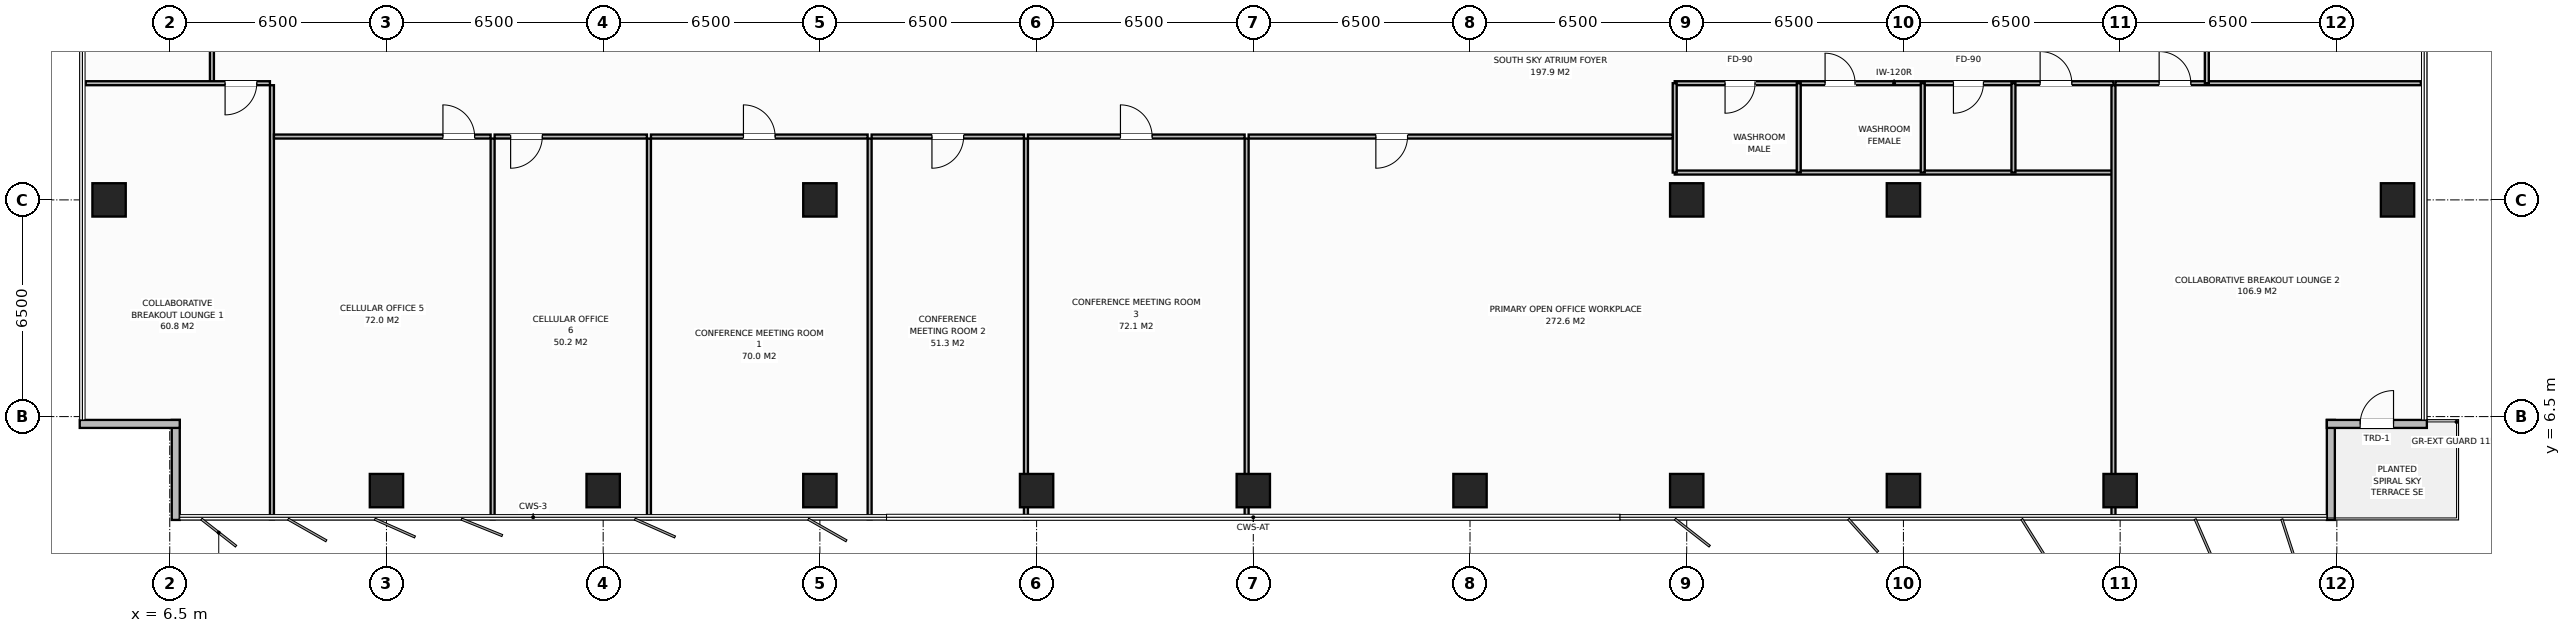
"""IFC4 building model, lengths in metres.
Left out: names, types, materials, properties, quantities, classifications, styles, units other than length and angle.
Written with IfcOpenShell. Run it as: python <this file> out.ifc"""

import sys

from ifc_helpers import new_model, si_unit, direction, frame, frame_2d, origin, origin_2d, place, context, subcontext, project, spatial, rectangle, extrude, element, fill, save


model = new_model("IFC4")
c1 = context("Model", 3, precision=1e-05, world=origin(), true_north=direction((0.0, 1.0)))
c2 = subcontext(c1, "Body", "Model", "MODEL_VIEW")
j1 = project(units=[si_unit("LENGTHUNIT", "METRE"), si_unit("PLANEANGLEUNIT", "RADIAN")], contexts=[c1])
p1 = place(None, origin())
s1 = spatial("IfcSite", under=j1, at=p1, CompositionType="ELEMENT")
p2 = place(p1, origin())
s2 = spatial("IfcBuilding", under=s1, at=p2, CompositionType="ELEMENT")
p3 = place(p2, frame((0.0, 0.0, 178.4)))
s3 = spatial("IfcBuildingStorey", under=s2, at=p3, CompositionType="ELEMENT", Elevation=178.4)
for number, where, z_axis, x_axis in (
    (1, (58.5, 13.0, 0.0), (0.0, 0.0, 1.0), (1.0, 0.0, 0.0)),
    (2, (26.0, 13.0, 0.0), (0.0, 0.0, 1.0), (1.0, 0.0, 0.0)),
    (3, (52.0, 13.0, 0.0), (0.0, 0.0, 1.0), (1.0, 0.0, 0.0)),
    (4, (13.0, 4.28, 0.0), (0.0, 0.0, 1.0), (1.0, 0.0, 0.0)),
    (5, (19.5, 4.28, 0.0), (0.0, 0.0, 1.0), (1.0, 0.0, 0.0)),
    (6, (26.0, 4.28, 0.0), (0.0, 0.0, 1.0), (1.0, 0.0, 0.0)),
    (7, (32.5, 4.28, 0.0), (0.0, 0.0, 1.0), (1.0, 0.0, 0.0)),
    (8, (39.0, 4.28, 0.0), (0.0, 0.0, 1.0), (1.0, 0.0, 0.0)),
    (9, (45.5, 4.28, 0.0), (0.0, 0.0, 1.0), (1.0, 0.0, 0.0)),
    (10, (52.0, 4.28, 0.0), (0.0, 0.0, 1.0), (1.0, 0.0, 0.0)),
    (11, (58.5, 4.28, 0.0), (0.0, 0.0, 1.0), (1.0, 0.0, 0.0)),
    (12, (65.0, 4.28, 0.0), (0.0, 0.0, 1.0), (1.0, 0.0, 0.0)),
    (13, (4.68, 13.0, 0.0), (0.0, 0.0, 1.0), (1.0, 0.0, 0.0)),
    (14, (73.32, 13.0, 0.0), (0.0, 0.0, 1.0), (1.0, 0.0, 0.0)),
):
    element("IfcColumn", number, at=place(p3, frame(where, z_axis=z_axis, x_axis=x_axis)), inside=s3, PredefinedType="COLUMN", context=c2, shape_type="SweptSolid", body=[
        extrude(rectangle(XDim=1.0, YDim=1.0, at=origin_2d()), origin(), (0.0, 0.0, 1.0), 3.8),
    ])
for number, where, z_axis, x_axis in (
    (15, (6.68, 3.4, 0.0), (0.0, 0.0, 1.0), (0.0, 1.0, 0.0)),
    (16, (6.8, 6.28, 0.0), (0.0, 0.0, 1.0), (-1.0, 0.0, 0.0)),
    (17, (71.32, 6.4, 0.0), (0.0, 0.0, 1.0), (0.0, -1.0, 0.0)),
):
    element("IfcWall", number, at=place(p3, frame(where, z_axis=z_axis, x_axis=x_axis)), inside=s3, PredefinedType="STANDARD", context=c2, shape_type="SweptSolid", body=[
        extrude(rectangle(XDim=3.0, YDim=0.24, at=frame_2d((1.5, 0.0))), origin(), (0.0, 0.0, 1.0), 3.572),
    ])
p4 = place(p3, frame((74.2, 6.28, 0.0), z_axis=(0.0, 0.0, 1.0), x_axis=(-1.0, 0.0, 0.0)))
e18 = element("IfcWall", 18, at=p4, inside=s3, PredefinedType="STANDARD", context=c2, shape_type="SweptSolid", body=[
    extrude(rectangle(XDim=3.0, YDim=0.24, at=frame_2d((1.5, 0.0))), origin(), (0.0, 0.0, 1.0), 3.572),
])
p5 = place(p4, frame((1.0, 0.0, 0.0)))
e19 = element("IfcOpeningElement", 19, at=p5, cuts=e18, PredefinedType="OPENING", context=c2, shape_type="SweptSolid", body=[
    extrude(rectangle(XDim=1.0, YDim=2.2, at=frame_2d((0.5, 1.1))), frame((0.0, 0.13, 0.0), z_axis=(0.0, -1.0, 0.0), x_axis=(1.0, 0.0, 0.0)), (0.0, 0.0, 1.0), 0.26),
])
p6 = place(p3, frame((7.765, 16.5, 0.0), z_axis=(0.0, 0.0, 1.0), x_axis=(0.0, 1.0, 0.0)))
e20 = element("IfcWall", 20, at=p6, inside=s3, PredefinedType="PARTITIONING", context=c2, shape_type="SweptSolid", body=[
    extrude(rectangle(XDim=2.1, YDim=0.12, at=frame_2d((1.05, 0.0))), origin(), (0.0, 0.0, 1.0), 3.572),
])
p7 = place(p3, frame((51.64, 16.5, 0.0), z_axis=(0.0, 0.0, 1.0), x_axis=(1.0, 0.0, 0.0)))
e21 = element("IfcWall", 21, at=p7, inside=s3, PredefinedType="PARTITIONING", context=c2, shape_type="SweptSolid", body=[
    extrude(rectangle(XDim=13.16, YDim=0.12, at=frame_2d((6.58, 0.0))), origin(), (0.0, 0.0, 1.0), 3.572),
])
p8 = place(p7, frame((1.51, 0.0, 0.0)))
e22 = element("IfcOpeningElement", 22, at=p8, cuts=e21, PredefinedType="OPENING", context=c2, shape_type="SweptSolid", body=[
    extrude(rectangle(XDim=0.9, YDim=2.15, at=frame_2d((0.45, 1.075))), frame((0.0, 0.07, 0.0), z_axis=(0.0, -1.0, 0.0), x_axis=(1.0, 0.0, 0.0)), (0.0, 0.0, 1.0), 0.14),
])
p9 = place(p7, frame((4.51, 0.0, 0.0)))
e23 = element("IfcOpeningElement", 23, at=p9, cuts=e21, PredefinedType="OPENING", context=c2, shape_type="SweptSolid", body=[
    extrude(rectangle(XDim=0.9, YDim=2.15, at=frame_2d((0.45, 1.075))), frame((0.0, 0.07, 0.0), z_axis=(0.0, -1.0, 0.0), x_axis=(1.0, 0.0, 0.0)), (0.0, 0.0, 1.0), 0.14),
])
p10 = place(p7, frame((8.36, 0.0, 0.0)))
e24 = element("IfcOpeningElement", 24, at=p10, cuts=e21, PredefinedType="OPENING", context=c2, shape_type="SweptSolid", body=[
    extrude(rectangle(XDim=0.9, YDim=2.15, at=frame_2d((0.45, 1.075))), frame((0.0, 0.07, 0.0), z_axis=(0.0, -1.0, 0.0), x_axis=(1.0, 0.0, 0.0)), (0.0, 0.0, 1.0), 0.14),
])
p11 = place(p7, frame((10.96, 0.0, 0.0)))
e25 = element("IfcOpeningElement", 25, at=p11, cuts=e21, PredefinedType="OPENING", context=c2, shape_type="SweptSolid", body=[
    extrude(rectangle(XDim=0.95, YDim=2.15, at=frame_2d((0.475, 1.075))), frame((0.0, 0.07, 0.0), z_axis=(0.0, -1.0, 0.0), x_axis=(1.0, 0.0, 0.0)), (0.0, 0.0, 1.0), 0.14),
])
p12 = place(p3, frame((51.64, 13.82, 0.0), z_axis=(0.0, 0.0, 1.0), x_axis=(1.0, 0.0, 0.0)))
e26 = element("IfcWall", 26, at=p12, inside=s3, PredefinedType="PARTITIONING", context=c2, shape_type="SweptSolid", body=[
    extrude(rectangle(XDim=13.16, YDim=0.12, at=frame_2d((6.58, 0.0))), origin(), (0.0, 0.0, 1.0), 3.572),
])
for number, where, z_axis, x_axis in (
    (27, (51.64, 13.82, 0.0), (0.0, 0.0, 1.0), (0.0, 1.0, 0.0)),
    (28, (55.36, 13.82, 0.0), (0.0, 0.0, 1.0), (0.0, 1.0, 0.0)),
    (29, (59.08, 13.82, 0.0), (0.0, 0.0, 1.0), (0.0, 1.0, 0.0)),
    (30, (61.8, 13.82, 0.0), (0.0, 0.0, 1.0), (0.0, 1.0, 0.0)),
):
    element("IfcWall", number, at=place(p3, frame(where, z_axis=z_axis, x_axis=x_axis)), inside=s3, PredefinedType="PARTITIONING", context=c2, shape_type="SweptSolid", body=[
        extrude(rectangle(XDim=2.68, YDim=0.12, at=frame_2d((1.34, 0.0))), origin(), (0.0, 0.0, 1.0), 3.572),
    ])
p13 = place(p3, frame((9.565, 3.42, 0.0), z_axis=(0.0, 0.0, 1.0), x_axis=(0.0, 1.0, 0.0)))
e31 = element("IfcWall", 31, at=p13, inside=s3, PredefinedType="PARTITIONING", context=c2, shape_type="SweptSolid", body=[
    extrude(rectangle(XDim=13.02, YDim=0.12, at=frame_2d((6.51, 0.0))), origin(), (0.0, 0.0, 1.0), 3.572),
])
p14 = place(p3, frame((3.98, 16.5, 0.0), z_axis=(0.0, 0.0, 1.0), x_axis=(1.0, 0.0, 0.0)))
e32 = element("IfcWall", 32, at=p14, inside=s3, PredefinedType="PARTITIONING", context=c2, shape_type="SweptSolid", body=[
    extrude(rectangle(XDim=5.525, YDim=0.12, at=frame_2d((2.762, 0.0))), origin(), (0.0, 0.0, 1.0), 3.572),
])
p15 = place(p14, frame((4.18, 0.0, 0.0)))
e33 = element("IfcOpeningElement", 33, at=p15, cuts=e32, PredefinedType="OPENING", context=c2, shape_type="SweptSolid", body=[
    extrude(rectangle(XDim=0.95, YDim=2.15, at=frame_2d((0.475, 1.075))), frame((0.0, 0.07, 0.0), z_axis=(0.0, -1.0, 0.0), x_axis=(1.0, 0.0, 0.0)), (0.0, 0.0, 1.0), 0.14),
])
p16 = place(p3, frame((16.184, 3.42, 0.0), z_axis=(0.0, 0.0, 1.0), x_axis=(0.0, 1.0, 0.0)))
e34 = element("IfcWall", 34, at=p16, inside=s3, PredefinedType="PARTITIONING", context=c2, shape_type="SweptSolid", body=[
    extrude(rectangle(XDim=11.42, YDim=0.12, at=frame_2d((5.71, 0.0))), origin(), (0.0, 0.0, 1.0), 3.572),
])
p17 = place(p3, frame((9.625, 14.9, 0.0), z_axis=(0.0, 0.0, 1.0), x_axis=(1.0, 0.0, 0.0)))
e35 = element("IfcWall", 35, at=p17, inside=s3, PredefinedType="PARTITIONING", context=c2, shape_type="SweptSolid", body=[
    extrude(rectangle(XDim=6.499, YDim=0.12, at=frame_2d((3.25, 0.0))), origin(), (0.0, 0.0, 1.0), 3.572),
])
p18 = place(p17, frame((5.069, 0.0, 0.0)))
e36 = element("IfcOpeningElement", 36, at=p18, cuts=e35, PredefinedType="OPENING", context=c2, shape_type="SweptSolid", body=[
    extrude(rectangle(XDim=0.95, YDim=2.15, at=frame_2d((0.475, 1.075))), frame((0.0, 0.07, 0.0), z_axis=(0.0, -1.0, 0.0), x_axis=(1.0, 0.0, 0.0)), (0.0, 0.0, 1.0), 0.14),
])
p19 = place(p3, frame((20.873, 3.42, 0.0), z_axis=(0.0, 0.0, 1.0), x_axis=(0.0, 1.0, 0.0)))
e37 = element("IfcWall", 37, at=p19, inside=s3, PredefinedType="PARTITIONING", context=c2, shape_type="SweptSolid", body=[
    extrude(rectangle(XDim=11.42, YDim=0.12, at=frame_2d((5.71, 0.0))), origin(), (0.0, 0.0, 1.0), 3.572),
])
p20 = place(p3, frame((16.244, 14.9, 0.0), z_axis=(0.0, 0.0, 1.0), x_axis=(1.0, 0.0, 0.0)))
e38 = element("IfcWall", 38, at=p20, inside=s3, PredefinedType="PARTITIONING", context=c2, shape_type="SweptSolid", body=[
    extrude(rectangle(XDim=4.569, YDim=0.12, at=frame_2d((2.284, 0.0))), origin(), (0.0, 0.0, 1.0), 3.572),
])
p21 = place(p20, frame((0.48, 0.0, 0.0)))
e39 = element("IfcOpeningElement", 39, at=p21, cuts=e38, PredefinedType="OPENING", context=c2, shape_type="SweptSolid", body=[
    extrude(rectangle(XDim=0.95, YDim=2.15, at=frame_2d((0.475, 1.075))), frame((0.0, 0.07, 0.0), z_axis=(0.0, -1.0, 0.0), x_axis=(1.0, 0.0, 0.0)), (0.0, 0.0, 1.0), 0.14),
])
p22 = place(p3, frame((27.492, 3.42, 0.0), z_axis=(0.0, 0.0, 1.0), x_axis=(0.0, 1.0, 0.0)))
e40 = element("IfcWall", 40, at=p22, inside=s3, PredefinedType="PARTITIONING", context=c2, shape_type="SweptSolid", body=[
    extrude(rectangle(XDim=11.42, YDim=0.12, at=frame_2d((5.71, 0.0))), origin(), (0.0, 0.0, 1.0), 3.572),
])
p23 = place(p3, frame((20.933, 14.9, 0.0), z_axis=(0.0, 0.0, 1.0), x_axis=(1.0, 0.0, 0.0)))
e41 = element("IfcWall", 41, at=p23, inside=s3, PredefinedType="PARTITIONING", context=c2, shape_type="SweptSolid", body=[
    extrude(rectangle(XDim=6.499, YDim=0.12, at=frame_2d((3.25, 0.0))), origin(), (0.0, 0.0, 1.0), 3.572),
])
p24 = place(p23, frame((2.775, 0.0, 0.0)))
e42 = element("IfcOpeningElement", 42, at=p24, cuts=e41, PredefinedType="OPENING", context=c2, shape_type="SweptSolid", body=[
    extrude(rectangle(XDim=0.95, YDim=2.15, at=frame_2d((0.475, 1.075))), frame((0.0, 0.07, 0.0), z_axis=(0.0, -1.0, 0.0), x_axis=(1.0, 0.0, 0.0)), (0.0, 0.0, 1.0), 0.14),
])
p25 = place(p3, frame((32.181, 3.42, 0.0), z_axis=(0.0, 0.0, 1.0), x_axis=(0.0, 1.0, 0.0)))
e43 = element("IfcWall", 43, at=p25, inside=s3, PredefinedType="PARTITIONING", context=c2, shape_type="SweptSolid", body=[
    extrude(rectangle(XDim=11.42, YDim=0.12, at=frame_2d((5.71, 0.0))), origin(), (0.0, 0.0, 1.0), 3.572),
])
p26 = place(p3, frame((27.552, 14.9, 0.0), z_axis=(0.0, 0.0, 1.0), x_axis=(1.0, 0.0, 0.0)))
e44 = element("IfcWall", 44, at=p26, inside=s3, PredefinedType="PARTITIONING", context=c2, shape_type="SweptSolid", body=[
    extrude(rectangle(XDim=4.569, YDim=0.12, at=frame_2d((2.284, 0.0))), origin(), (0.0, 0.0, 1.0), 3.572),
])
p27 = place(p26, frame((1.809, 0.0, 0.0)))
e45 = element("IfcOpeningElement", 45, at=p27, cuts=e44, PredefinedType="OPENING", context=c2, shape_type="SweptSolid", body=[
    extrude(rectangle(XDim=0.95, YDim=2.15, at=frame_2d((0.475, 1.075))), frame((0.0, 0.07, 0.0), z_axis=(0.0, -1.0, 0.0), x_axis=(1.0, 0.0, 0.0)), (0.0, 0.0, 1.0), 0.14),
])
p28 = place(p3, frame((38.8, 3.42, 0.0), z_axis=(0.0, 0.0, 1.0), x_axis=(0.0, 1.0, 0.0)))
e46 = element("IfcWall", 46, at=p28, inside=s3, PredefinedType="PARTITIONING", context=c2, shape_type="SweptSolid", body=[
    extrude(rectangle(XDim=11.42, YDim=0.12, at=frame_2d((5.71, 0.0))), origin(), (0.0, 0.0, 1.0), 3.022),
])
p29 = place(p3, frame((32.241, 14.9, 0.0), z_axis=(0.0, 0.0, 1.0), x_axis=(1.0, 0.0, 0.0)))
e47 = element("IfcWall", 47, at=p29, inside=s3, PredefinedType="PARTITIONING", context=c2, shape_type="SweptSolid", body=[
    extrude(rectangle(XDim=6.499, YDim=0.12, at=frame_2d((3.25, 0.0))), origin(), (0.0, 0.0, 1.0), 3.572),
])
p30 = place(p29, frame((2.775, 0.0, 0.0)))
e48 = element("IfcOpeningElement", 48, at=p30, cuts=e47, PredefinedType="OPENING", context=c2, shape_type="SweptSolid", body=[
    extrude(rectangle(XDim=0.95, YDim=2.15, at=frame_2d((0.475, 1.075))), frame((0.0, 0.07, 0.0), z_axis=(0.0, -1.0, 0.0), x_axis=(1.0, 0.0, 0.0)), (0.0, 0.0, 1.0), 0.14),
])
p31 = place(p3, frame((64.8, 3.42, 0.0), z_axis=(0.0, 0.0, 1.0), x_axis=(0.0, 1.0, 0.0)))
e49 = element("IfcWall", 49, at=p31, inside=s3, PredefinedType="PARTITIONING", context=c2, shape_type="SweptSolid", body=[
    extrude(rectangle(XDim=13.02, YDim=0.12, at=frame_2d((6.51, 0.0))), origin(), (0.0, 0.0, 1.0), 3.022),
])
p32 = place(p3, frame((38.86, 14.9, 0.0), z_axis=(0.0, 0.0, 1.0), x_axis=(1.0, 0.0, 0.0)))
e50 = element("IfcWall", 50, at=p32, inside=s3, PredefinedType="PARTITIONING", context=c2, shape_type="SweptSolid", body=[
    extrude(rectangle(XDim=12.72, YDim=0.12, at=frame_2d((6.36, 0.0))), origin(), (0.0, 0.0, 1.0), 3.572),
])
p33 = place(p32, frame((3.816, 0.0, 0.0)))
e51 = element("IfcOpeningElement", 51, at=p33, cuts=e50, PredefinedType="OPENING", context=c2, shape_type="SweptSolid", body=[
    extrude(rectangle(XDim=0.95, YDim=2.15, at=frame_2d((0.475, 1.075))), frame((0.0, 0.07, 0.0), z_axis=(0.0, -1.0, 0.0), x_axis=(1.0, 0.0, 0.0)), (0.0, 0.0, 1.0), 0.14),
])
p34 = place(p3, frame((64.86, 16.5, 0.0), z_axis=(0.0, 0.0, 1.0), x_axis=(1.0, 0.0, 0.0)))
e52 = element("IfcWall", 52, at=p34, inside=s3, PredefinedType="PARTITIONING", context=c2, shape_type="SweptSolid", body=[
    extrude(rectangle(XDim=9.16, YDim=0.12, at=frame_2d((4.58, 0.0))), origin(), (0.0, 0.0, 1.0), 3.572),
])
p35 = place(p34, frame((1.31, 0.0, 0.0)))
e53 = element("IfcOpeningElement", 53, at=p35, cuts=e52, PredefinedType="OPENING", context=c2, shape_type="SweptSolid", body=[
    extrude(rectangle(XDim=0.95, YDim=2.15, at=frame_2d((0.475, 1.075))), frame((0.0, 0.07, 0.0), z_axis=(0.0, -1.0, 0.0), x_axis=(1.0, 0.0, 0.0)), (0.0, 0.0, 1.0), 0.14),
])
p36 = place(p3, frame((67.6, 16.5, 0.0), z_axis=(0.0, 0.0, 1.0), x_axis=(0.0, 1.0, 0.0)))
e54 = element("IfcWall", 54, at=p36, inside=s3, PredefinedType="PARTITIONING", context=c2, shape_type="SweptSolid", body=[
    extrude(rectangle(XDim=19.0, YDim=0.12, at=frame_2d((9.5, 0.0))), origin(), (0.0, 0.0, 1.0), 3.572),
])
p37 = place(p36, frame((9.025, 0.0, 0.0)))
e55 = element("IfcOpeningElement", 55, at=p37, cuts=e54, PredefinedType="OPENING", context=c2, shape_type="SweptSolid", body=[
    extrude(rectangle(XDim=0.95, YDim=2.15, at=frame_2d((0.475, 1.075))), frame((0.0, 0.07, 0.0), z_axis=(0.0, -1.0, 0.0), x_axis=(1.0, 0.0, 0.0)), (0.0, 0.0, 1.0), 0.14),
])
p38 = place(p5, origin())
e56 = element("IfcDoor", 56, at=p38, inside=s3, OperationType="SINGLE_SWING_RIGHT", PredefinedType="DOOR", context=c2, shape_type="SweptSolid", body=[
    extrude(rectangle(XDim=1.0, YDim=2.2, at=frame_2d((0.5, 1.1))), frame((0.0, 0.025, 0.0), z_axis=(0.0, -1.0, 0.0), x_axis=(1.0, 0.0, 0.0)), (0.0, 0.0, 1.0), 0.05),
])
fill(e19, e56)
p39 = place(p8, origin())
e57 = element("IfcDoor", 57, at=p39, inside=s3, OperationType="SINGLE_SWING_RIGHT", PredefinedType="DOOR", context=c2, shape_type="SweptSolid", body=[
    extrude(rectangle(XDim=0.9, YDim=2.15, at=frame_2d((0.45, 1.075))), frame((0.0, 0.025, 0.0), z_axis=(0.0, -1.0, 0.0), x_axis=(1.0, 0.0, 0.0)), (0.0, 0.0, 1.0), 0.05),
])
fill(e22, e57)
p40 = place(p9, origin())
e58 = element("IfcDoor", 58, at=p40, inside=s3, OperationType="SINGLE_SWING_LEFT", PredefinedType="DOOR", context=c2, shape_type="SweptSolid", body=[
    extrude(rectangle(XDim=0.9, YDim=2.15, at=frame_2d((0.45, 1.075))), frame((0.0, 0.025, 0.0), z_axis=(0.0, -1.0, 0.0), x_axis=(1.0, 0.0, 0.0)), (0.0, 0.0, 1.0), 0.05),
])
fill(e23, e58)
p41 = place(p10, origin())
e59 = element("IfcDoor", 59, at=p41, inside=s3, OperationType="SINGLE_SWING_RIGHT", PredefinedType="DOOR", context=c2, shape_type="SweptSolid", body=[
    extrude(rectangle(XDim=0.9, YDim=2.15, at=frame_2d((0.45, 1.075))), frame((0.0, 0.025, 0.0), z_axis=(0.0, -1.0, 0.0), x_axis=(1.0, 0.0, 0.0)), (0.0, 0.0, 1.0), 0.05),
])
fill(e24, e59)
p42 = place(p11, origin())
e60 = element("IfcDoor", 60, at=p42, inside=s3, OperationType="SINGLE_SWING_LEFT", PredefinedType="DOOR", context=c2, shape_type="SweptSolid", body=[
    extrude(rectangle(XDim=0.95, YDim=2.15, at=frame_2d((0.475, 1.075))), frame((0.0, 0.025, 0.0), z_axis=(0.0, -1.0, 0.0), x_axis=(1.0, 0.0, 0.0)), (0.0, 0.0, 1.0), 0.05),
])
fill(e25, e60)
p43 = place(p15, origin())
e61 = element("IfcDoor", 61, at=p43, inside=s3, OperationType="SINGLE_SWING_RIGHT", PredefinedType="DOOR", context=c2, shape_type="SweptSolid", body=[
    extrude(rectangle(XDim=0.95, YDim=2.15, at=frame_2d((0.475, 1.075))), frame((0.0, 0.025, 0.0), z_axis=(0.0, -1.0, 0.0), x_axis=(1.0, 0.0, 0.0)), (0.0, 0.0, 1.0), 0.05),
])
fill(e33, e61)
p44 = place(p18, origin())
e62 = element("IfcDoor", 62, at=p44, inside=s3, OperationType="SINGLE_SWING_LEFT", PredefinedType="DOOR", context=c2, shape_type="SweptSolid", body=[
    extrude(rectangle(XDim=0.95, YDim=2.15, at=frame_2d((0.475, 1.075))), frame((0.0, 0.025, 0.0), z_axis=(0.0, -1.0, 0.0), x_axis=(1.0, 0.0, 0.0)), (0.0, 0.0, 1.0), 0.05),
])
fill(e36, e62)
p45 = place(p21, origin())
e63 = element("IfcDoor", 63, at=p45, inside=s3, OperationType="SINGLE_SWING_RIGHT", PredefinedType="DOOR", context=c2, shape_type="SweptSolid", body=[
    extrude(rectangle(XDim=0.95, YDim=2.15, at=frame_2d((0.475, 1.075))), frame((0.0, 0.025, 0.0), z_axis=(0.0, -1.0, 0.0), x_axis=(1.0, 0.0, 0.0)), (0.0, 0.0, 1.0), 0.05),
])
fill(e39, e63)
p46 = place(p24, origin())
e64 = element("IfcDoor", 64, at=p46, inside=s3, OperationType="SINGLE_SWING_LEFT", PredefinedType="DOOR", context=c2, shape_type="SweptSolid", body=[
    extrude(rectangle(XDim=0.95, YDim=2.15, at=frame_2d((0.475, 1.075))), frame((0.0, 0.025, 0.0), z_axis=(0.0, -1.0, 0.0), x_axis=(1.0, 0.0, 0.0)), (0.0, 0.0, 1.0), 0.05),
])
fill(e42, e64)
p47 = place(p27, origin())
e65 = element("IfcDoor", 65, at=p47, inside=s3, OperationType="SINGLE_SWING_RIGHT", PredefinedType="DOOR", context=c2, shape_type="SweptSolid", body=[
    extrude(rectangle(XDim=0.95, YDim=2.15, at=frame_2d((0.475, 1.075))), frame((0.0, 0.025, 0.0), z_axis=(0.0, -1.0, 0.0), x_axis=(1.0, 0.0, 0.0)), (0.0, 0.0, 1.0), 0.05),
])
fill(e45, e65)
p48 = place(p30, origin())
e66 = element("IfcDoor", 66, at=p48, inside=s3, OperationType="SINGLE_SWING_LEFT", PredefinedType="DOOR", context=c2, shape_type="SweptSolid", body=[
    extrude(rectangle(XDim=0.95, YDim=2.15, at=frame_2d((0.475, 1.075))), frame((0.0, 0.025, 0.0), z_axis=(0.0, -1.0, 0.0), x_axis=(1.0, 0.0, 0.0)), (0.0, 0.0, 1.0), 0.05),
])
fill(e48, e66)
p49 = place(p33, origin())
e67 = element("IfcDoor", 67, at=p49, inside=s3, OperationType="SINGLE_SWING_RIGHT", PredefinedType="DOOR", context=c2, shape_type="SweptSolid", body=[
    extrude(rectangle(XDim=0.95, YDim=2.15, at=frame_2d((0.475, 1.075))), frame((0.0, 0.025, 0.0), z_axis=(0.0, -1.0, 0.0), x_axis=(1.0, 0.0, 0.0)), (0.0, 0.0, 1.0), 0.05),
])
fill(e51, e67)
p50 = place(p35, origin())
e68 = element("IfcDoor", 68, at=p50, inside=s3, OperationType="SINGLE_SWING_LEFT", PredefinedType="DOOR", context=c2, shape_type="SweptSolid", body=[
    extrude(rectangle(XDim=0.95, YDim=2.15, at=frame_2d((0.475, 1.075))), frame((0.0, 0.025, 0.0), z_axis=(0.0, -1.0, 0.0), x_axis=(1.0, 0.0, 0.0)), (0.0, 0.0, 1.0), 0.05),
])
fill(e53, e68)
save(model, sys.argv[1])
